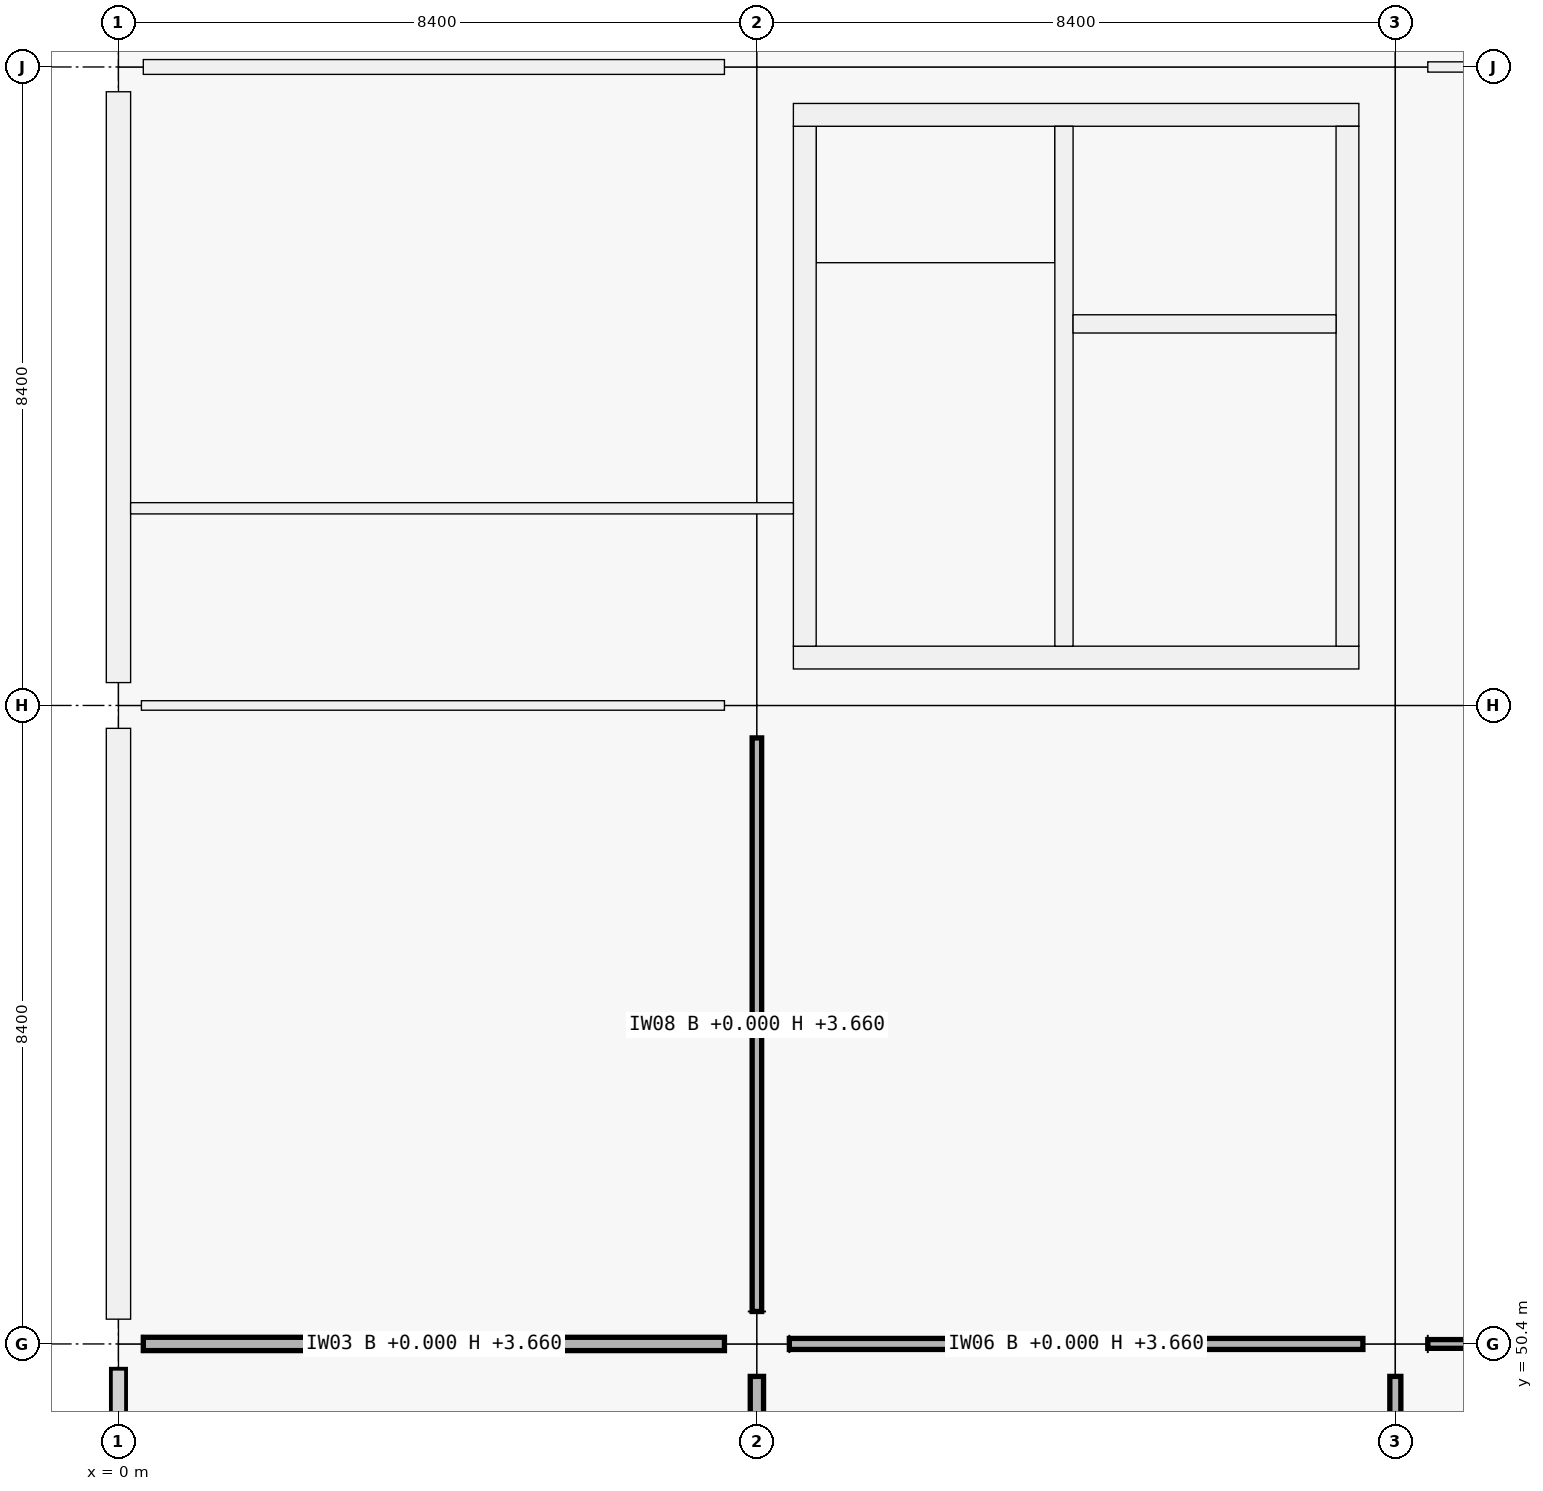
"""IFC4 building model, lengths in metres.
Left out: names, types, materials, properties, quantities, classifications, styles, units other than length and angle.
Written with IfcOpenShell. Run it as: python <this file> out.ifc"""

import sys

from ifc_helpers import new_model, si_unit, direction, frame, frame_2d, origin, origin_2d, place, context, subcontext, project, spatial, rectangle, extrude, element, fill, save


model = new_model("IFC4")
c1 = context("Model", 3, precision=1e-05, world=origin(), true_north=direction((0.0, 1.0)))
c2 = subcontext(c1, "Body", "Model", "MODEL_VIEW")
j1 = project(units=[si_unit("LENGTHUNIT", "METRE"), si_unit("PLANEANGLEUNIT", "RADIAN")], contexts=[c1])
p1 = place(None, origin())
s1 = spatial("IfcSite", under=j1, at=p1, CompositionType="ELEMENT")
p2 = place(p1, origin())
s2 = spatial("IfcBuilding", under=s1, at=p2, CompositionType="ELEMENT")
p3 = place(p2, origin())
s3 = spatial("IfcBuildingStorey", under=s2, at=p3, CompositionType="ELEMENT", Elevation=0.0)
p4 = place(p3, frame((0.0, 50.4, 0.0), z_axis=(0.0, 0.0, 1.0), x_axis=(1.0, 0.0, 0.0)))
e1 = element("IfcColumn", 1, at=p4, inside=s3, PredefinedType="COLUMN", context=c2, shape_type="SweptSolid", body=[
    extrude(rectangle(XDim=0.65, YDim=0.65, at=origin_2d()), origin(), (0.0, 0.0, 1.0), 5.76),
])
p5 = place(p3, frame((0.0, 58.8, 0.0), z_axis=(0.0, 0.0, 1.0), x_axis=(1.0, 0.0, 0.0)))
e2 = element("IfcColumn", 2, at=p5, inside=s3, PredefinedType="COLUMN", context=c2, shape_type="SweptSolid", body=[
    extrude(rectangle(XDim=0.6, YDim=0.6, at=origin_2d()), origin(), (0.0, 0.0, 1.0), 5.76),
])
p6 = place(p3, frame((0.0, 67.2, 0.0), z_axis=(0.0, 0.0, 1.0), x_axis=(1.0, 0.0, 0.0)))
e3 = element("IfcColumn", 3, at=p6, inside=s3, PredefinedType="COLUMN", context=c2, shape_type="SweptSolid", body=[
    extrude(rectangle(XDim=0.65, YDim=0.65, at=origin_2d()), origin(), (0.0, 0.0, 1.0), 5.76),
])
for number, where, z_axis, x_axis in (
    (4, (8.4, 50.4, 0.0), (0.0, 0.0, 1.0), (1.0, 0.0, 0.0)),
    (5, (8.4, 58.8, 0.0), (0.0, 0.0, 1.0), (1.0, 0.0, 0.0)),
    (6, (8.4, 67.2, 0.0), (0.0, 0.0, 1.0), (1.0, 0.0, 0.0)),
    (7, (16.8, 50.4, 0.0), (0.0, 0.0, 1.0), (1.0, 0.0, 0.0)),
    (8, (16.8, 58.8, 0.0), (0.0, 0.0, 1.0), (1.0, 0.0, 0.0)),
    (9, (16.8, 67.2, 0.0), (0.0, 0.0, 1.0), (1.0, 0.0, 0.0)),
):
    element("IfcColumn", number, at=place(p3, frame(where, z_axis=z_axis, x_axis=x_axis)), inside=s3, PredefinedType="COLUMN", context=c2, shape_type="SweptSolid", body=[
        extrude(rectangle(XDim=0.85, YDim=0.85, at=origin_2d()), origin(), (0.0, 0.0, 1.0), 5.76),
    ])
p7 = place(p3, frame((0.0, 50.726, 0.0), z_axis=(0.0, 0.0, 1.0), x_axis=(0.0, 1.0, 0.0)))
e10 = element("IfcWall", 10, at=p7, inside=s3, PredefinedType="SOLIDWALL", context=c2, shape_type="SweptSolid", body=[
    extrude(rectangle(XDim=7.773, YDim=0.32, at=frame_2d((3.886, 0.0))), origin(), (0.0, 0.0, 1.0), 4.7),
])
p8 = place(p7, frame((2.837, 0.0, 0.0)))
e11 = element("IfcOpeningElement", 11, at=p8, cuts=e10, PredefinedType="OPENING", context=c2, shape_type="SweptSolid", body=[
    extrude(rectangle(XDim=2.1, YDim=2.25, at=frame_2d((1.05, 1.125))), frame((0.0, 0.16, 0.0), z_axis=(0.0, -1.0, 0.0), x_axis=(1.0, 0.0, 0.0)), (0.0, 0.0, 1.0), 0.32),
])
p9 = place(p3, frame((0.0, 59.101, 0.0), z_axis=(0.0, 0.0, 1.0), x_axis=(0.0, 1.0, 0.0)))
e12 = element("IfcWall", 12, at=p9, inside=s3, PredefinedType="SOLIDWALL", context=c2, shape_type="SweptSolid", body=[
    extrude(rectangle(XDim=7.773, YDim=0.32, at=frame_2d((3.886, 0.0))), origin(), (0.0, 0.0, 1.0), 4.7),
])
p10 = place(p9, frame((3.136, 0.0, 0.9)))
e13 = element("IfcOpeningElement", 13, at=p10, cuts=e12, PredefinedType="OPENING", context=c2, shape_type="SweptSolid", body=[
    extrude(rectangle(XDim=1.5, YDim=1.8, at=frame_2d((0.75, 0.9))), frame((0.0, 0.16, 0.0), z_axis=(0.0, -1.0, 0.0), x_axis=(1.0, 0.0, 0.0)), (0.0, 0.0, 1.0), 0.32),
])
p11 = place(p9, frame((0.149, 0.0, 0.0)))
e14 = element("IfcOpeningElement", 14, at=p11, cuts=e12, PredefinedType="OPENING", context=c2, shape_type="SweptSolid", body=[
    extrude(rectangle(XDim=2.0, YDim=2.25, at=frame_2d((1.0, 1.125))), frame((0.0, 0.16, 0.0), z_axis=(0.0, -1.0, 0.0), x_axis=(1.0, 0.0, 0.0)), (0.0, 0.0, 1.0), 0.32),
])
p12 = place(p3, frame((16.32, 59.43, 0.0), z_axis=(0.0, 0.0, 1.0), x_axis=(-1.0, 0.0, 0.0)))
e15 = element("IfcWall", 15, at=p12, inside=s3, PredefinedType="SHEAR", context=c2, shape_type="SweptSolid", body=[
    extrude(rectangle(XDim=7.44, YDim=0.3, at=frame_2d((3.72, 0.0))), origin(), (0.0, 0.0, 1.0), 5.76),
])
p13 = place(p12, frame((1.28, 0.0, 0.0)))
e16 = element("IfcOpeningElement", 16, at=p13, cuts=e15, PredefinedType="OPENING", context=c2, shape_type="SweptSolid", body=[
    extrude(rectangle(XDim=1.5, YDim=2.15, at=frame_2d((0.75, 1.075))), frame((0.0, 0.15, 0.0), z_axis=(0.0, -1.0, 0.0), x_axis=(1.0, 0.0, 0.0)), (0.0, 0.0, 1.0), 0.3),
])
p14 = place(p3, frame((9.03, 59.58, 0.0), z_axis=(0.0, 0.0, 1.0), x_axis=(0.0, 1.0, 0.0)))
e17 = element("IfcWall", 17, at=p14, inside=s3, PredefinedType="SHEAR", context=c2, shape_type="SweptSolid", body=[
    extrude(rectangle(XDim=6.84, YDim=0.3, at=frame_2d((3.42, 0.0))), origin(), (0.0, 0.0, 1.0), 5.76),
])
p15 = place(p14, frame((0.12, 0.0, 0.0)))
e18 = element("IfcOpeningElement", 18, at=p15, cuts=e17, PredefinedType="OPENING", context=c2, shape_type="SweptSolid", body=[
    extrude(rectangle(XDim=1.0, YDim=2.15, at=frame_2d((0.5, 1.075))), frame((0.0, 0.15, 0.0), z_axis=(0.0, -1.0, 0.0), x_axis=(1.0, 0.0, 0.0)), (0.0, 0.0, 1.0), 0.3),
])
p16 = place(p3, frame((8.88, 66.57, 0.0), z_axis=(0.0, 0.0, 1.0), x_axis=(1.0, 0.0, 0.0)))
e19 = element("IfcWall", 19, at=p16, inside=s3, PredefinedType="SHEAR", context=c2, shape_type="SweptSolid", body=[
    extrude(rectangle(XDim=7.44, YDim=0.3, at=frame_2d((3.72, 0.0))), origin(), (0.0, 0.0, 1.0), 5.76),
])
p17 = place(p3, frame((16.17, 66.42, 0.0), z_axis=(0.0, 0.0, 1.0), x_axis=(0.0, -1.0, 0.0)))
e20 = element("IfcWall", 20, at=p17, inside=s3, PredefinedType="SHEAR", context=c2, shape_type="SweptSolid", body=[
    extrude(rectangle(XDim=6.84, YDim=0.3, at=frame_2d((3.42, 0.0))), origin(), (0.0, 0.0, 1.0), 5.76),
])
p18 = place(p3, frame((12.44, 59.58, 0.0), z_axis=(0.0, 0.0, 1.0), x_axis=(0.0, 1.0, 0.0)))
e21 = element("IfcWall", 21, at=p18, inside=s3, PredefinedType="SHEAR", context=c2, shape_type="SweptSolid", body=[
    extrude(rectangle(XDim=6.84, YDim=0.24, at=frame_2d((3.42, 0.0))), origin(), (0.0, 0.0, 1.0), 5.76),
])
p19 = place(p18, frame((0.12, 0.0, 0.0)))
e22 = element("IfcOpeningElement", 22, at=p19, cuts=e21, PredefinedType="OPENING", context=c2, shape_type="SweptSolid", body=[
    extrude(rectangle(XDim=1.0, YDim=2.15, at=frame_2d((0.5, 1.075))), frame((0.0, 0.12, 0.0), z_axis=(0.0, -1.0, 0.0), x_axis=(1.0, 0.0, 0.0)), (0.0, 0.0, 1.0), 0.24),
])
p20 = place(p3, frame((12.56, 63.82, 0.0), z_axis=(0.0, 0.0, 1.0), x_axis=(1.0, 0.0, 0.0)))
e23 = element("IfcWall", 23, at=p20, inside=s3, PredefinedType="SHEAR", context=c2, shape_type="SweptSolid", body=[
    extrude(rectangle(XDim=3.46, YDim=0.24, at=frame_2d((1.73, 0.0))), origin(), (0.0, 0.0, 1.0), 5.76),
])
p21 = place(p20, frame((1.18, 0.0, 0.0)))
e24 = element("IfcOpeningElement", 24, at=p21, cuts=e23, PredefinedType="OPENING", context=c2, shape_type="SweptSolid", body=[
    extrude(rectangle(XDim=1.1, YDim=2.15, at=frame_2d((0.55, 1.075))), frame((0.0, 0.12, 0.0), z_axis=(0.0, -1.0, 0.0), x_axis=(1.0, 0.0, 0.0)), (0.0, 0.0, 1.0), 0.24),
])
p22 = place(p3, frame((0.327, 50.4, 0.0), z_axis=(0.0, 0.0, 1.0), x_axis=(1.0, 0.0, 0.0)))
e25 = element("IfcWall", 25, at=p22, inside=s3, PredefinedType="PARTITIONING", context=c2, shape_type="SweptSolid", body=[
    extrude(rectangle(XDim=7.646, YDim=0.175, at=frame_2d((3.823, 0.0))), origin(), (0.0, 0.0, 1.0), 3.66),
])
p23 = place(p22, frame((3.318, 0.0, 0.0)))
e26 = element("IfcOpeningElement", 26, at=p23, cuts=e25, PredefinedType="OPENING", context=c2, shape_type="SweptSolid", body=[
    extrude(rectangle(XDim=1.01, YDim=2.12, at=frame_2d((0.505, 1.06))), frame((0.0, 0.087, 0.0), z_axis=(0.0, -1.0, 0.0), x_axis=(1.0, 0.0, 0.0)), (0.0, 0.0, 1.0), 0.175),
])
p24 = place(p3, frame((0.302, 58.8, 0.0), z_axis=(0.0, 0.0, 1.0), x_axis=(1.0, 0.0, 0.0)))
e27 = element("IfcWall", 27, at=p24, inside=s3, PredefinedType="PARTITIONING", context=c2, shape_type="SweptSolid", body=[
    extrude(rectangle(XDim=7.671, YDim=0.125, at=frame_2d((3.835, 0.0))), origin(), (0.0, 0.0, 1.0), 3.66),
])
p25 = place(p24, frame((3.316, 0.0, 0.0)))
e28 = element("IfcOpeningElement", 28, at=p25, cuts=e27, PredefinedType="OPENING", context=c2, shape_type="SweptSolid", body=[
    extrude(rectangle(XDim=1.04, YDim=2.2, at=frame_2d((0.52, 1.1))), frame((0.0, 0.062, 0.0), z_axis=(0.0, -1.0, 0.0), x_axis=(1.0, 0.0, 0.0)), (0.0, 0.0, 1.0), 0.125),
])
p26 = place(p3, frame((0.327, 67.2, 0.0), z_axis=(0.0, 0.0, 1.0), x_axis=(1.0, 0.0, 0.0)))
e29 = element("IfcWall", 29, at=p26, inside=s3, PredefinedType="PARTITIONING", context=c2, shape_type="SweptSolid", body=[
    extrude(rectangle(XDim=7.646, YDim=0.195, at=frame_2d((3.823, 0.0))), origin(), (0.0, 0.0, 1.0), 3.66),
])
p27 = place(p26, frame((3.313, 0.0, 0.0)))
e30 = element("IfcOpeningElement", 30, at=p27, cuts=e29, PredefinedType="OPENING", context=c2, shape_type="SweptSolid", body=[
    extrude(rectangle(XDim=1.02, YDim=2.2, at=frame_2d((0.51, 1.1))), frame((0.0, 0.098, 0.0), z_axis=(0.0, -1.0, 0.0), x_axis=(1.0, 0.0, 0.0)), (0.0, 0.0, 1.0), 0.195),
])
p28 = place(p3, frame((8.827, 50.4, 0.0), z_axis=(0.0, 0.0, 1.0), x_axis=(1.0, 0.0, 0.0)))
e31 = element("IfcWall", 31, at=p28, inside=s3, PredefinedType="PARTITIONING", context=c2, shape_type="SweptSolid", body=[
    extrude(rectangle(XDim=7.546, YDim=0.145, at=frame_2d((3.773, 0.0))), origin(), (0.0, 0.0, 1.0), 3.66),
])
p29 = place(p28, frame((3.263, 0.0, 0.0)))
e32 = element("IfcOpeningElement", 32, at=p29, cuts=e31, PredefinedType="OPENING", context=c2, shape_type="SweptSolid", body=[
    extrude(rectangle(XDim=1.02, YDim=2.2, at=frame_2d((0.51, 1.1))), frame((0.0, 0.073, 0.0), z_axis=(0.0, -1.0, 0.0), x_axis=(1.0, 0.0, 0.0)), (0.0, 0.0, 1.0), 0.145),
])
p30 = place(p3, frame((17.227, 50.4, 0.0), z_axis=(0.0, 0.0, 1.0), x_axis=(1.0, 0.0, 0.0)))
e33 = element("IfcWall", 33, at=p30, inside=s3, PredefinedType="PARTITIONING", context=c2, shape_type="SweptSolid", body=[
    extrude(rectangle(XDim=7.546, YDim=0.115, at=frame_2d((3.773, 0.0))), origin(), (0.0, 0.0, 1.0), 3.66),
])
p31 = place(p30, frame((0.578, 0.0, 0.0)))
e34 = element("IfcOpeningElement", 34, at=p31, cuts=e33, PredefinedType="OPENING", context=c2, shape_type="SweptSolid", body=[
    extrude(rectangle(XDim=0.92, YDim=2.1, at=frame_2d((0.46, 1.05))), frame((0.0, 0.058, 0.0), z_axis=(0.0, -1.0, 0.0), x_axis=(1.0, 0.0, 0.0)), (0.0, 0.0, 1.0), 0.115),
])
p32 = place(p30, frame((4.468, 0.0, 0.0)))
e35 = element("IfcOpeningElement", 35, at=p32, cuts=e33, PredefinedType="OPENING", context=c2, shape_type="SweptSolid", body=[
    extrude(rectangle(XDim=0.98, YDim=2.08, at=frame_2d((0.49, 1.04))), frame((0.0, 0.058, 0.0), z_axis=(0.0, -1.0, 0.0), x_axis=(1.0, 0.0, 0.0)), (0.0, 0.0, 1.0), 0.115),
])
p33 = place(p3, frame((17.227, 67.2, 0.0), z_axis=(0.0, 0.0, 1.0), x_axis=(1.0, 0.0, 0.0)))
e36 = element("IfcWall", 36, at=p33, inside=s3, PredefinedType="PARTITIONING", context=c2, shape_type="SweptSolid", body=[
    extrude(rectangle(XDim=7.546, YDim=0.135, at=frame_2d((3.773, 0.0))), origin(), (0.0, 0.0, 1.0), 3.66),
])
p34 = place(p33, frame((3.283, 0.0, 0.0)))
e37 = element("IfcOpeningElement", 37, at=p34, cuts=e36, PredefinedType="OPENING", context=c2, shape_type="SweptSolid", body=[
    extrude(rectangle(XDim=0.98, YDim=2.18, at=frame_2d((0.49, 1.09))), frame((0.0, 0.067, 0.0), z_axis=(0.0, -1.0, 0.0), x_axis=(1.0, 0.0, 0.0)), (0.0, 0.0, 1.0), 0.135),
])
p35 = place(p3, frame((8.4, 42.427, 0.0), z_axis=(0.0, 0.0, 1.0), x_axis=(0.0, 1.0, 0.0)))
e38 = element("IfcWall", 38, at=p35, inside=s3, PredefinedType="PARTITIONING", context=c2, shape_type="SweptSolid", body=[
    extrude(rectangle(XDim=7.546, YDim=0.175, at=frame_2d((3.773, 0.0))), origin(), (0.0, 0.0, 1.0), 3.66),
])
p36 = place(p35, frame((3.303, 0.0, 0.0)))
e39 = element("IfcOpeningElement", 39, at=p36, cuts=e38, PredefinedType="OPENING", context=c2, shape_type="SweptSolid", body=[
    extrude(rectangle(XDim=0.94, YDim=2.15, at=frame_2d((0.47, 1.075))), frame((0.0, 0.087, 0.0), z_axis=(0.0, -1.0, 0.0), x_axis=(1.0, 0.0, 0.0)), (0.0, 0.0, 1.0), 0.175),
])
p37 = place(p3, frame((8.4, 50.827, 0.0), z_axis=(0.0, 0.0, 1.0), x_axis=(0.0, 1.0, 0.0)))
e40 = element("IfcWall", 40, at=p37, inside=s3, PredefinedType="PARTITIONING", context=c2, shape_type="SweptSolid", body=[
    extrude(rectangle(XDim=7.546, YDim=0.125, at=frame_2d((3.773, 0.0))), origin(), (0.0, 0.0, 1.0), 3.66),
])
p38 = place(p37, frame((3.263, 0.0, 0.0)))
e41 = element("IfcOpeningElement", 41, at=p38, cuts=e40, PredefinedType="OPENING", context=c2, shape_type="SweptSolid", body=[
    extrude(rectangle(XDim=1.02, YDim=2.2, at=frame_2d((0.51, 1.1))), frame((0.0, 0.062, 0.0), z_axis=(0.0, -1.0, 0.0), x_axis=(1.0, 0.0, 0.0)), (0.0, 0.0, 1.0), 0.125),
])
p39 = place(p3, frame((16.8, 42.427, 0.0), z_axis=(0.0, 0.0, 1.0), x_axis=(0.0, 1.0, 0.0)))
e42 = element("IfcWall", 42, at=p39, inside=s3, PredefinedType="PARTITIONING", context=c2, shape_type="SweptSolid", body=[
    extrude(rectangle(XDim=7.546, YDim=0.145, at=frame_2d((3.773, 0.0))), origin(), (0.0, 0.0, 1.0), 3.66),
])
p40 = place(p3, frame((0.16, 61.394, 0.0), z_axis=(0.0, 0.0, 1.0), x_axis=(1.0, 0.0, 0.0)))
e43 = element("IfcWall", 43, at=p40, inside=s3, PredefinedType="PARTITIONING", context=c2, shape_type="SweptSolid", body=[
    extrude(rectangle(XDim=8.72, YDim=0.148, at=frame_2d((4.36, 0.0))), origin(), (0.0, 0.0, 1.0), 3.66),
])
p41 = place(p8, origin())
e44 = element("IfcDoor", 44, at=p41, inside=s3, OperationType="DOUBLE_DOOR_SINGLE_SWING", PredefinedType="DOOR", context=c2, shape_type="SweptSolid", body=[
    extrude(rectangle(XDim=2.1, YDim=2.25, at=frame_2d((1.05, 1.125))), frame((0.0, 0.025, 0.0), z_axis=(0.0, -1.0, 0.0), x_axis=(1.0, 0.0, 0.0)), (0.0, 0.0, 1.0), 0.05),
])
fill(e11, e44)
p42 = place(p10, origin())
e45 = element("IfcWindow", 45, at=p42, inside=s3, PartitioningType="SINGLE_PANEL", PredefinedType="WINDOW", context=c2, shape_type="SweptSolid", body=[
    extrude(rectangle(XDim=1.5, YDim=1.8, at=frame_2d((0.75, 0.9))), frame((0.0, 0.03, 0.0), z_axis=(0.0, -1.0, 0.0), x_axis=(1.0, 0.0, 0.0)), (0.0, 0.0, 1.0), 0.06),
])
fill(e13, e45)
p43 = place(p11, origin())
e46 = element("IfcDoor", 46, at=p43, inside=s3, OperationType="DOUBLE_DOOR_SINGLE_SWING", PredefinedType="DOOR", context=c2, shape_type="SweptSolid", body=[
    extrude(rectangle(XDim=2.0, YDim=2.25, at=frame_2d((1.0, 1.125))), frame((0.0, 0.025, 0.0), z_axis=(0.0, -1.0, 0.0), x_axis=(1.0, 0.0, 0.0)), (0.0, 0.0, 1.0), 0.05),
])
fill(e14, e46)
p44 = place(p19, origin())
e47 = element("IfcDoor", 47, at=p44, inside=s3, OperationType="SINGLE_SWING_LEFT", PredefinedType="DOOR", context=c2, shape_type="SweptSolid", body=[
    extrude(rectangle(XDim=1.0, YDim=2.15, at=frame_2d((0.5, 1.075))), frame((0.0, 0.025, 0.0), z_axis=(0.0, -1.0, 0.0), x_axis=(1.0, 0.0, 0.0)), (0.0, 0.0, 1.0), 0.05),
])
fill(e22, e47)
p45 = place(p13, origin())
e48 = element("IfcDoor", 48, at=p45, inside=s3, OperationType="DOUBLE_DOOR_SINGLE_SWING", PredefinedType="DOOR", context=c2, shape_type="SweptSolid", body=[
    extrude(rectangle(XDim=1.5, YDim=2.15, at=frame_2d((0.75, 1.075))), frame((0.0, 0.025, 0.0), z_axis=(0.0, -1.0, 0.0), x_axis=(1.0, 0.0, 0.0)), (0.0, 0.0, 1.0), 0.05),
])
fill(e16, e48)
p46 = place(p15, origin())
e49 = element("IfcDoor", 49, at=p46, inside=s3, OperationType="SINGLE_SWING_RIGHT", PredefinedType="DOOR", context=c2, shape_type="SweptSolid", body=[
    extrude(rectangle(XDim=1.0, YDim=2.15, at=frame_2d((0.5, 1.075))), frame((0.0, 0.025, 0.0), z_axis=(0.0, -1.0, 0.0), x_axis=(1.0, 0.0, 0.0)), (0.0, 0.0, 1.0), 0.05),
])
fill(e18, e49)
p47 = place(p21, origin())
e50 = element("IfcDoor", 50, at=p47, inside=s3, OperationType="DOUBLE_DOOR_SLIDING", PredefinedType="DOOR", context=c2, shape_type="SweptSolid", body=[
    extrude(rectangle(XDim=1.1, YDim=2.15, at=frame_2d((0.55, 1.075))), frame((0.0, 0.025, 0.0), z_axis=(0.0, -1.0, 0.0), x_axis=(1.0, 0.0, 0.0)), (0.0, 0.0, 1.0), 0.05),
])
fill(e24, e50)
p48 = place(p29, origin())
e51 = element("IfcDoor", 51, at=p48, inside=s3, OperationType="SINGLE_SWING_RIGHT", PredefinedType="DOOR", context=c2, shape_type="SweptSolid", body=[
    extrude(rectangle(XDim=1.02, YDim=2.2, at=frame_2d((0.51, 1.1))), frame((0.0, 0.025, 0.0), z_axis=(0.0, -1.0, 0.0), x_axis=(1.0, 0.0, 0.0)), (0.0, 0.0, 1.0), 0.05),
])
fill(e32, e51)
p49 = place(p38, origin())
e52 = element("IfcDoor", 52, at=p49, inside=s3, OperationType="SINGLE_SWING_LEFT", PredefinedType="DOOR", context=c2, shape_type="SweptSolid", body=[
    extrude(rectangle(XDim=1.02, YDim=2.2, at=frame_2d((0.51, 1.1))), frame((0.0, 0.025, 0.0), z_axis=(0.0, -1.0, 0.0), x_axis=(1.0, 0.0, 0.0)), (0.0, 0.0, 1.0), 0.05),
])
fill(e41, e52)
p50 = place(p25, origin())
e53 = element("IfcDoor", 53, at=p50, inside=s3, OperationType="SINGLE_SWING_RIGHT", PredefinedType="DOOR", context=c2, shape_type="SweptSolid", body=[
    extrude(rectangle(XDim=1.04, YDim=2.2, at=frame_2d((0.52, 1.1))), frame((0.0, 0.025, 0.0), z_axis=(0.0, -1.0, 0.0), x_axis=(1.0, 0.0, 0.0)), (0.0, 0.0, 1.0), 0.05),
])
fill(e28, e53)
p51 = place(p27, origin())
e54 = element("IfcDoor", 54, at=p51, inside=s3, OperationType="SINGLE_SWING_LEFT", PredefinedType="DOOR", context=c2, shape_type="SweptSolid", body=[
    extrude(rectangle(XDim=1.02, YDim=2.2, at=frame_2d((0.51, 1.1))), frame((0.0, 0.025, 0.0), z_axis=(0.0, -1.0, 0.0), x_axis=(1.0, 0.0, 0.0)), (0.0, 0.0, 1.0), 0.05),
])
fill(e30, e54)
p52 = place(p23, origin())
e55 = element("IfcDoor", 55, at=p52, inside=s3, OperationType="SINGLE_SWING_RIGHT", PredefinedType="DOOR", context=c2, shape_type="SweptSolid", body=[
    extrude(rectangle(XDim=1.01, YDim=2.12, at=frame_2d((0.505, 1.06))), frame((0.0, 0.025, 0.0), z_axis=(0.0, -1.0, 0.0), x_axis=(1.0, 0.0, 0.0)), (0.0, 0.0, 1.0), 0.05),
])
fill(e26, e55)
save(model, sys.argv[1])
